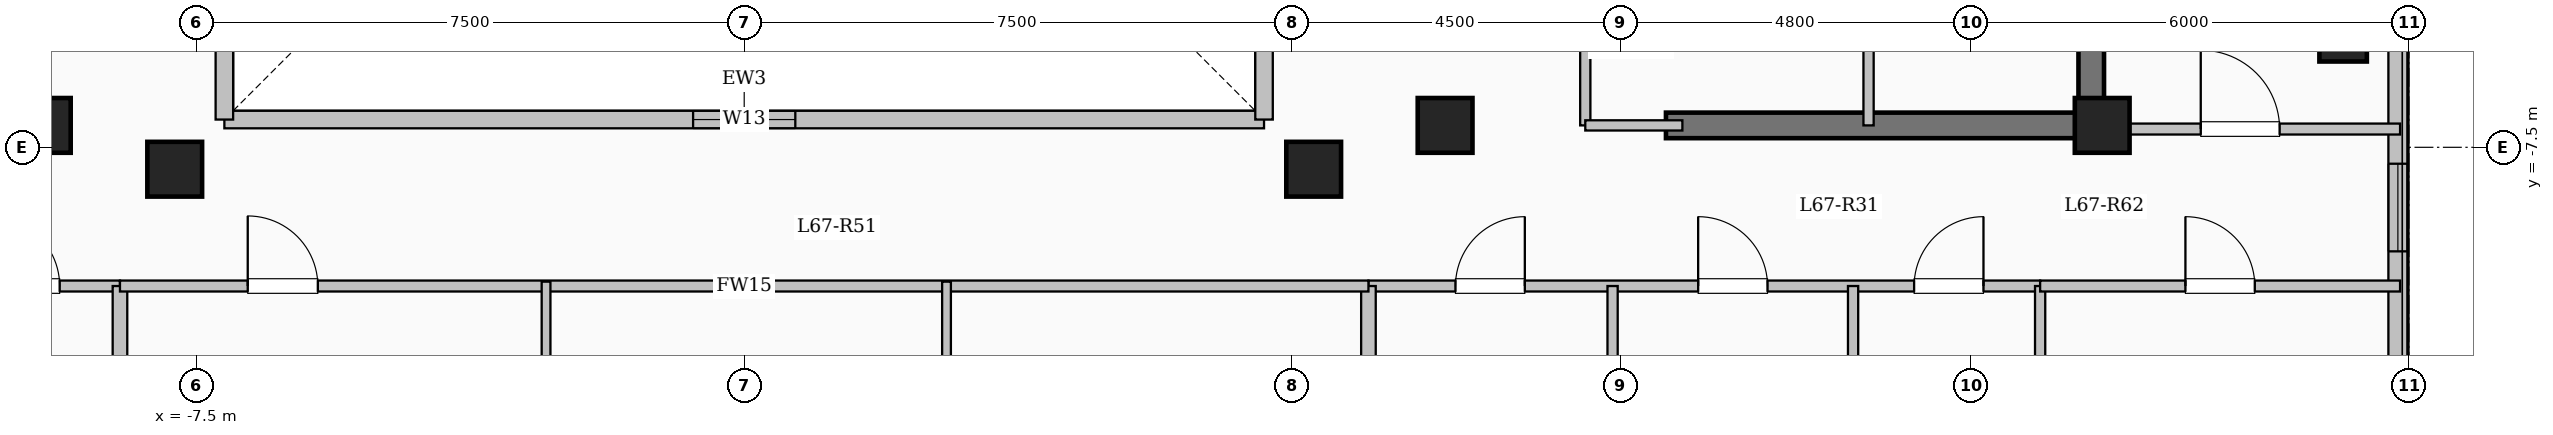
"""IFC4 building model, lengths in metres.
Left out: names, types, materials, properties, quantities, classifications, styles, units other than length and angle.
Written with IfcOpenShell. Run it as: python <this file> out.ifc"""

import sys

from ifc_helpers import new_model, si_unit, direction, frame, frame_2d, origin, origin_2d, place, context, subcontext, project, spatial, rectangle, extrude, element, fill, save


model = new_model("IFC4")
c1 = context("Model", 3, precision=1e-05, world=origin(), true_north=direction((0.0, 1.0)))
c2 = subcontext(c1, "Body", "Model", "MODEL_VIEW")
j1 = project(units=[si_unit("LENGTHUNIT", "METRE"), si_unit("PLANEANGLEUNIT", "RADIAN")], contexts=[c1])
p1 = place(None, origin())
s1 = spatial("IfcSite", under=j1, at=p1, CompositionType="ELEMENT")
p2 = place(p1, origin())
s2 = spatial("IfcBuilding", under=s1, at=p2, CompositionType="ELEMENT")
p3 = place(p2, frame((0.0, 0.0, 248.2)))
s3 = spatial("IfcBuildingStorey", under=s2, at=p3, CompositionType="ELEMENT", Elevation=248.2)
for number, where, z_axis, x_axis in (
    (1, (-7.8, -7.8, 0.0), (0.0, 0.0, 1.0), (1.0, 0.0, 0.0)),
    (2, (7.8, -7.8, 0.0), (0.0, 0.0, 1.0), (1.0, 0.0, 0.0)),
    (3, (-9.6, -7.2, 0.0), (0.0, 0.0, 1.0), (1.0, 0.0, 0.0)),
    (4, (9.6, -7.2, 0.0), (0.0, 0.0, 1.0), (1.0, 0.0, 0.0)),
    (5, (18.6, -7.2, 0.0), (0.0, 0.0, 1.0), (1.0, 0.0, 0.0)),
):
    element("IfcColumn", number, at=place(p3, frame(where, z_axis=z_axis, x_axis=x_axis)), inside=s3, PredefinedType="COLUMN", context=c2, shape_type="SweptSolid", body=[
        extrude(rectangle(XDim=0.75, YDim=0.75, at=origin_2d()), origin(), (0.0, 0.0, 1.0), 3.35),
    ])
p4 = place(p3, frame((21.9, -6.0, 0.0), z_axis=(0.0, 0.0, 1.0), x_axis=(1.0, 0.0, 0.0)))
e6 = element("IfcColumn", 6, at=p4, inside=s3, PredefinedType="COLUMN", context=c2, shape_type="SweptSolid", body=[
    extrude(rectangle(XDim=0.65, YDim=0.65, at=origin_2d()), origin(), (0.0, 0.0, 1.0), 3.35),
])
p5 = place(p3, frame((-7.12, -7.12, 0.0), z_axis=(0.0, 0.0, 1.0), x_axis=(1.0, 0.0, 0.0)))
e7 = element("IfcWall", 7, at=p5, inside=s3, PredefinedType="SOLIDWALL", context=c2, shape_type="SweptSolid", body=[
    extrude(rectangle(XDim=14.24, YDim=0.24, at=frame_2d((7.12, 0.0))), origin(), (0.0, 0.0, 1.0), 3.1),
])
p6 = place(p5, frame((6.42, 0.0, 0.95)))
e8 = element("IfcOpeningElement", 8, at=p6, cuts=e7, PredefinedType="OPENING", context=c2, shape_type="SweptSolid", body=[
    extrude(rectangle(XDim=1.4, YDim=1.5, at=frame_2d((0.7, 0.75))), frame((0.0, 0.13, 0.0), z_axis=(0.0, -1.0, 0.0), x_axis=(1.0, 0.0, 0.0)), (0.0, 0.0, 1.0), 0.26),
])
p7 = place(p3, frame((7.12, -7.12, 0.0), z_axis=(0.0, 0.0, 1.0), x_axis=(0.0, 1.0, 0.0)))
e9 = element("IfcWall", 9, at=p7, inside=s3, PredefinedType="SOLIDWALL", context=c2, shape_type="SweptSolid", body=[
    extrude(rectangle(XDim=14.24, YDim=0.24, at=frame_2d((7.12, 0.0))), origin(), (0.0, 0.0, 1.0), 3.1),
])
p8 = place(p7, frame((6.42, 0.0, 0.95)))
e10 = element("IfcOpeningElement", 10, at=p8, cuts=e9, PredefinedType="OPENING", context=c2, shape_type="SweptSolid", body=[
    extrude(rectangle(XDim=1.4, YDim=1.5, at=frame_2d((0.7, 0.75))), frame((0.0, 0.13, 0.0), z_axis=(0.0, -1.0, 0.0), x_axis=(1.0, 0.0, 0.0)), (0.0, 0.0, 1.0), 0.26),
])
p9 = place(p3, frame((-7.12, 7.12, 0.0), z_axis=(0.0, 0.0, 1.0), x_axis=(0.0, -1.0, 0.0)))
e11 = element("IfcWall", 11, at=p9, inside=s3, PredefinedType="SOLIDWALL", context=c2, shape_type="SweptSolid", body=[
    extrude(rectangle(XDim=14.24, YDim=0.24, at=frame_2d((7.12, 0.0))), origin(), (0.0, 0.0, 1.0), 3.1),
])
p10 = place(p9, frame((6.42, 0.0, 0.95)))
e12 = element("IfcOpeningElement", 12, at=p10, cuts=e11, PredefinedType="OPENING", context=c2, shape_type="SweptSolid", body=[
    extrude(rectangle(XDim=1.4, YDim=1.5, at=frame_2d((0.7, 0.75))), frame((0.0, 0.13, 0.0), z_axis=(0.0, -1.0, 0.0), x_axis=(1.0, 0.0, 0.0)), (0.0, 0.0, 1.0), 0.26),
])
p11 = place(p3, frame((22.65, 17.55, 0.0), z_axis=(0.0, 0.0, 1.0), x_axis=(0.0, -1.0, 0.0)))
e13 = element("IfcWall", 13, at=p11, inside=s3, PredefinedType="SOLIDWALL", context=c2, shape_type="SweptSolid", body=[
    extrude(rectangle(XDim=35.1, YDim=0.26, at=frame_2d((17.55, 0.0))), origin(), (0.0, 0.0, 1.0), 3.1),
])
p12 = place(p11, frame((1.525, 0.0, 0.9)))
e14 = element("IfcOpeningElement", 14, at=p12, cuts=e13, PredefinedType="OPENING", context=c2, shape_type="SweptSolid", body=[
    extrude(rectangle(XDim=2.0, YDim=1.7, at=frame_2d((1.0, 0.85))), frame((0.0, 0.14, 0.0), z_axis=(0.0, -1.0, 0.0), x_axis=(1.0, 0.0, 0.0)), (0.0, 0.0, 1.0), 0.28),
])
p13 = place(p11, frame((5.425, 0.0, 0.95)))
e15 = element("IfcOpeningElement", 15, at=p13, cuts=e13, PredefinedType="OPENING", context=c2, shape_type="SweptSolid", body=[
    extrude(rectangle(XDim=1.0, YDim=1.5, at=frame_2d((0.5, 0.75))), frame((0.0, 0.14, 0.0), z_axis=(0.0, -1.0, 0.0), x_axis=(1.0, 0.0, 0.0)), (0.0, 0.0, 1.0), 0.28),
])
p14 = place(p11, frame((14.8, 0.0, 0.9)))
e16 = element("IfcOpeningElement", 16, at=p14, cuts=e13, PredefinedType="OPENING", context=c2, shape_type="SweptSolid", body=[
    extrude(rectangle(XDim=2.0, YDim=1.7, at=frame_2d((1.0, 0.85))), frame((0.0, 0.14, 0.0), z_axis=(0.0, -1.0, 0.0), x_axis=(1.0, 0.0, 0.0)), (0.0, 0.0, 1.0), 0.28),
])
p15 = place(p11, frame((25.275, 0.0, 0.95)))
e17 = element("IfcOpeningElement", 17, at=p15, cuts=e13, PredefinedType="OPENING", context=c2, shape_type="SweptSolid", body=[
    extrude(rectangle(XDim=1.2, YDim=1.5, at=frame_2d((0.6, 0.75))), frame((0.0, 0.14, 0.0), z_axis=(0.0, -1.0, 0.0), x_axis=(1.0, 0.0, 0.0)), (0.0, 0.0, 1.0), 0.28),
])
p16 = place(p11, frame((29.925, 0.0, 0.9)))
e18 = element("IfcOpeningElement", 18, at=p16, cuts=e13, PredefinedType="OPENING", context=c2, shape_type="SweptSolid", body=[
    extrude(rectangle(XDim=2.2, YDim=1.75, at=frame_2d((1.1, 0.875))), frame((0.0, 0.14, 0.0), z_axis=(0.0, -1.0, 0.0), x_axis=(1.0, 0.0, 0.0)), (0.0, 0.0, 1.0), 0.28),
])
p17 = place(p3, frame((18.45, -7.375, 0.0), z_axis=(0.0, 0.0, 1.0), x_axis=(0.0, 1.0, 0.0)))
e19 = element("IfcWall", 19, at=p17, inside=s3, PredefinedType="SHEAR", context=c2, shape_type="SweptSolid", body=[
    extrude(rectangle(XDim=14.05, YDim=0.35, at=frame_2d((7.025, 0.0))), origin(), (0.0, 0.0, 1.0), 3.35),
])
p18 = place(p3, frame((12.625, -7.2, 0.0), z_axis=(0.0, 0.0, 1.0), x_axis=(1.0, 0.0, 0.0)))
e20 = element("IfcWall", 20, at=p18, inside=s3, PredefinedType="SHEAR", context=c2, shape_type="SweptSolid", body=[
    extrude(rectangle(XDim=6.0, YDim=0.35, at=frame_2d((3.0, 0.0))), origin(), (0.0, 0.0, 1.0), 3.35),
])
p19 = place(p3, frame((15.4, -7.2, 0.0), z_axis=(0.0, 0.0, 1.0), x_axis=(0.0, 1.0, 0.0)))
e21 = element("IfcWall", 21, at=p19, inside=s3, PredefinedType="PARTITIONING", context=c2, shape_type="SweptSolid", body=[
    extrude(rectangle(XDim=10.45, YDim=0.14, at=frame_2d((5.225, 0.0))), origin(), (0.0, 0.0, 1.0), 3.1),
])
p20 = place(p19, frame((9.25, 0.0, 0.0)))
e22 = element("IfcOpeningElement", 22, at=p20, cuts=e21, PredefinedType="OPENING", context=c2, shape_type="SweptSolid", body=[
    extrude(rectangle(XDim=0.9, YDim=2.08, at=frame_2d((0.45, 1.04))), frame((0.0, 0.08, 0.0), z_axis=(0.0, -1.0, 0.0), x_axis=(1.0, 0.0, 0.0)), (0.0, 0.0, 1.0), 0.16),
])
p21 = place(p3, frame((11.52, -7.2, 0.0), z_axis=(0.0, 0.0, 1.0), x_axis=(0.0, 1.0, 0.0)))
e23 = element("IfcWall", 23, at=p21, inside=s3, PredefinedType="PARTITIONING", context=c2, shape_type="SweptSolid", body=[
    extrude(rectangle(XDim=9.12, YDim=0.14, at=frame_2d((4.56, 0.0))), origin(), (0.0, 0.0, 1.0), 3.1),
])
p22 = place(p21, frame((1.8, 0.0, 0.0)))
e24 = element("IfcOpeningElement", 24, at=p22, cuts=e23, PredefinedType="OPENING", context=c2, shape_type="SweptSolid", body=[
    extrude(rectangle(XDim=0.9, YDim=2.08, at=frame_2d((0.45, 1.04))), frame((0.0, 0.08, 0.0), z_axis=(0.0, -1.0, 0.0), x_axis=(1.0, 0.0, 0.0)), (0.0, 0.0, 1.0), 0.16),
])
p23 = place(p21, frame((6.2, 0.0, 0.0)))
e25 = element("IfcOpeningElement", 25, at=p23, cuts=e23, PredefinedType="OPENING", context=c2, shape_type="SweptSolid", body=[
    extrude(rectangle(XDim=0.9, YDim=2.08, at=frame_2d((0.45, 1.04))), frame((0.0, 0.08, 0.0), z_axis=(0.0, -1.0, 0.0), x_axis=(1.0, 0.0, 0.0)), (0.0, 0.0, 1.0), 0.16),
])
p24 = place(p3, frame((11.52, -7.2, 0.0), z_axis=(0.0, 0.0, 1.0), x_axis=(1.0, 0.0, 0.0)))
e26 = element("IfcWall", 26, at=p24, inside=s3, PredefinedType="PARTITIONING", context=c2, shape_type="SweptSolid", body=[
    extrude(rectangle(XDim=1.33, YDim=0.14, at=frame_2d((0.665, 0.0))), origin(), (0.0, 0.0, 1.0), 2.235),
])
p25 = place(p3, frame((-17.75, -9.4, 0.0), z_axis=(0.0, 0.0, 1.0), x_axis=(1.0, 0.0, 0.0)))
e27 = element("IfcWall", 27, at=p25, inside=s3, PredefinedType="PARTITIONING", context=c2, shape_type="SweptSolid", body=[
    extrude(rectangle(XDim=9.2, YDim=0.15, at=frame_2d((4.6, 0.0))), origin(), (0.0, 0.0, 1.0), 3.1),
])
p26 = place(p25, frame((1.142, 0.0, 0.0)))
e28 = element("IfcOpeningElement", 28, at=p26, cuts=e27, PredefinedType="OPENING", context=c2, shape_type="SweptSolid", body=[
    extrude(rectangle(XDim=0.95, YDim=2.15, at=frame_2d((0.475, 1.075))), frame((0.0, 0.085, 0.0), z_axis=(0.0, -1.0, 0.0), x_axis=(1.0, 0.0, 0.0)), (0.0, 0.0, 1.0), 0.17),
])
p27 = place(p25, frame((4.466, 0.0, 0.0)))
e29 = element("IfcOpeningElement", 29, at=p27, cuts=e27, PredefinedType="OPENING", context=c2, shape_type="SweptSolid", body=[
    extrude(rectangle(XDim=0.95, YDim=2.15, at=frame_2d((0.475, 1.075))), frame((0.0, 0.085, 0.0), z_axis=(0.0, -1.0, 0.0), x_axis=(1.0, 0.0, 0.0)), (0.0, 0.0, 1.0), 0.17),
])
p28 = place(p25, frame((7.424, 0.0, 0.0)))
e30 = element("IfcOpeningElement", 30, at=p28, cuts=e27, PredefinedType="OPENING", context=c2, shape_type="SweptSolid", body=[
    extrude(rectangle(XDim=0.95, YDim=2.15, at=frame_2d((0.475, 1.075))), frame((0.0, 0.085, 0.0), z_axis=(0.0, -1.0, 0.0), x_axis=(1.0, 0.0, 0.0)), (0.0, 0.0, 1.0), 0.17),
])
p29 = place(p3, frame((8.55, -9.4, 0.0), z_axis=(0.0, 0.0, 1.0), x_axis=(1.0, 0.0, 0.0)))
e31 = element("IfcWall", 31, at=p29, inside=s3, PredefinedType="PARTITIONING", context=c2, shape_type="SweptSolid", body=[
    extrude(rectangle(XDim=9.2, YDim=0.15, at=frame_2d((4.6, 0.0))), origin(), (0.0, 0.0, 1.0), 3.1),
])
p30 = place(p29, frame((1.192, 0.0, 0.0)))
e32 = element("IfcOpeningElement", 32, at=p30, cuts=e31, PredefinedType="OPENING", context=c2, shape_type="SweptSolid", body=[
    extrude(rectangle(XDim=0.95, YDim=2.15, at=frame_2d((0.475, 1.075))), frame((0.0, 0.085, 0.0), z_axis=(0.0, -1.0, 0.0), x_axis=(1.0, 0.0, 0.0)), (0.0, 0.0, 1.0), 0.17),
])
p31 = place(p29, frame((4.516, 0.0, 0.0)))
e33 = element("IfcOpeningElement", 33, at=p31, cuts=e31, PredefinedType="OPENING", context=c2, shape_type="SweptSolid", body=[
    extrude(rectangle(XDim=0.95, YDim=2.15, at=frame_2d((0.475, 1.075))), frame((0.0, 0.085, 0.0), z_axis=(0.0, -1.0, 0.0), x_axis=(1.0, 0.0, 0.0)), (0.0, 0.0, 1.0), 0.17),
])
p32 = place(p29, frame((7.474, 0.0, 0.0)))
e34 = element("IfcOpeningElement", 34, at=p32, cuts=e31, PredefinedType="OPENING", context=c2, shape_type="SweptSolid", body=[
    extrude(rectangle(XDim=0.95, YDim=2.15, at=frame_2d((0.475, 1.075))), frame((0.0, 0.085, 0.0), z_axis=(0.0, -1.0, 0.0), x_axis=(1.0, 0.0, 0.0)), (0.0, 0.0, 1.0), 0.17),
])
p33 = place(p3, frame((11.894, -20.85, 0.0), z_axis=(0.0, 0.0, 1.0), x_axis=(0.0, 1.0, 0.0)))
e35 = element("IfcWall", 35, at=p33, inside=s3, PredefinedType="PARTITIONING", context=c2, shape_type="SweptSolid", body=[
    extrude(rectangle(XDim=11.45, YDim=0.14, at=frame_2d((5.725, 0.0))), origin(), (0.0, 0.0, 1.0), 3.1),
])
p34 = place(p3, frame((15.188, -20.85, 0.0), z_axis=(0.0, 0.0, 1.0), x_axis=(0.0, 1.0, 0.0)))
e36 = element("IfcWall", 36, at=p34, inside=s3, PredefinedType="PARTITIONING", context=c2, shape_type="SweptSolid", body=[
    extrude(rectangle(XDim=11.45, YDim=0.14, at=frame_2d((5.725, 0.0))), origin(), (0.0, 0.0, 1.0), 2.685),
])
for number, where, z_axis, x_axis in (
    (37, (-8.55, -21.504, 0.0), (0.0, 0.0, 1.0), (0.0, 1.0, 0.0)),
    (38, (8.55, -21.504, 0.0), (0.0, 0.0, 1.0), (0.0, 1.0, 0.0)),
):
    element("IfcWall", number, at=place(p3, frame(where, z_axis=z_axis, x_axis=x_axis)), inside=s3, PredefinedType="SOLIDWALL", context=c2, shape_type="SweptSolid", body=[
        extrude(rectangle(XDim=12.104, YDim=0.2, at=frame_2d((6.052, 0.0))), origin(), (0.0, 0.0, 1.0), 3.1),
    ])
p35 = place(p3, frame((-8.55, -9.4, 0.0), z_axis=(0.0, 0.0, 1.0), x_axis=(1.0, 0.0, 0.0)))
e39 = element("IfcWall", 39, at=p35, inside=s3, PredefinedType="PARTITIONING", context=c2, shape_type="SweptSolid", body=[
    extrude(rectangle(XDim=17.1, YDim=0.15, at=frame_2d((8.55, 0.0))), origin(), (0.0, 0.0, 1.0), 3.1),
])
p36 = place(p35, frame((1.75, 0.0, 0.0)))
e40 = element("IfcOpeningElement", 40, at=p36, cuts=e39, PredefinedType="OPENING", context=c2, shape_type="SweptSolid", body=[
    extrude(rectangle(XDim=0.96, YDim=2.15, at=frame_2d((0.48, 1.075))), frame((0.0, 0.085, 0.0), z_axis=(0.0, -1.0, 0.0), x_axis=(1.0, 0.0, 0.0)), (0.0, 0.0, 1.0), 0.17),
])
p37 = place(p3, frame((-2.714, -22.38, 0.0), z_axis=(0.0, 0.0, 1.0), x_axis=(0.0, 1.0, 0.0)))
e41 = element("IfcWall", 41, at=p37, inside=s3, PredefinedType="PARTITIONING", context=c2, shape_type="SweptSolid", body=[
    extrude(rectangle(XDim=13.04, YDim=0.12, at=frame_2d((6.52, 0.0))), origin(), (0.0, 0.0, 1.0), 3.1),
])
p38 = place(p37, frame((8.705, 0.0, 0.0)))
e42 = element("IfcOpeningElement", 42, at=p38, cuts=e41, PredefinedType="OPENING", context=c2, shape_type="SweptSolid", body=[
    extrude(rectangle(XDim=1.08, YDim=2.15, at=frame_2d((0.54, 1.075))), frame((0.0, 0.07, 0.0), z_axis=(0.0, -1.0, 0.0), x_axis=(1.0, 0.0, 0.0)), (0.0, 0.0, 1.0), 0.14),
])
p39 = place(p3, frame((2.771, -12.31, 0.0), z_axis=(0.0, 0.0, 1.0), x_axis=(0.0, 1.0, 0.0)))
e43 = element("IfcWall", 43, at=p39, inside=s3, PredefinedType="PARTITIONING", context=c2, shape_type="SweptSolid", body=[
    extrude(rectangle(XDim=2.97, YDim=0.12, at=frame_2d((1.485, 0.0))), origin(), (0.0, 0.0, 1.0), 3.1),
])
p40 = place(p3, frame((18.45, -7.25, 0.0), z_axis=(0.0, 0.0, 1.0), x_axis=(1.0, 0.0, 0.0)))
e44 = element("IfcWall", 44, at=p40, inside=s3, PredefinedType="PARTITIONING", context=c2, shape_type="SweptSolid", body=[
    extrude(rectangle(XDim=4.23, YDim=0.15, at=frame_2d((2.115, 0.0))), origin(), (0.0, 0.0, 1.0), 3.1),
])
p41 = place(p40, frame((1.5, 0.0, 0.0)))
e45 = element("IfcOpeningElement", 45, at=p41, cuts=e44, PredefinedType="OPENING", context=c2, shape_type="SweptSolid", body=[
    extrude(rectangle(XDim=1.08, YDim=2.15, at=frame_2d((0.54, 1.075))), frame((0.0, 0.085, 0.0), z_axis=(0.0, -1.0, 0.0), x_axis=(1.0, 0.0, 0.0)), (0.0, 0.0, 1.0), 0.17),
])
p42 = place(p3, frame((17.75, -17.55, 0.0), z_axis=(0.0, 0.0, 1.0), x_axis=(0.0, 1.0, 0.0)))
e46 = element("IfcWall", 46, at=p42, inside=s3, PredefinedType="PARTITIONING", context=c2, shape_type="SweptSolid", body=[
    extrude(rectangle(XDim=8.15, YDim=0.14, at=frame_2d((4.075, 0.0))), origin(), (0.0, 0.0, 1.0), 3.1),
])
p43 = place(p3, frame((17.75, -9.4, 0.0), z_axis=(0.0, 0.0, 1.0), x_axis=(1.0, 0.0, 0.0)))
e47 = element("IfcWall", 47, at=p43, inside=s3, PredefinedType="PARTITIONING", context=c2, shape_type="SweptSolid", body=[
    extrude(rectangle(XDim=4.93, YDim=0.15, at=frame_2d((2.465, 0.0))), origin(), (0.0, 0.0, 1.0), 3.1),
])
p44 = place(p43, frame((1.99, 0.0, 0.0)))
e48 = element("IfcOpeningElement", 48, at=p44, cuts=e47, PredefinedType="OPENING", context=c2, shape_type="SweptSolid", body=[
    extrude(rectangle(XDim=0.95, YDim=2.15, at=frame_2d((0.475, 1.075))), frame((0.0, 0.085, 0.0), z_axis=(0.0, -1.0, 0.0), x_axis=(1.0, 0.0, 0.0)), (0.0, 0.0, 1.0), 0.17),
])
p45 = place(p6, origin())
e49 = element("IfcWindow", 49, at=p45, inside=s3, PartitioningType="SINGLE_PANEL", PredefinedType="WINDOW", context=c2, shape_type="SweptSolid", body=[
    extrude(rectangle(XDim=1.4, YDim=1.5, at=frame_2d((0.7, 0.75))), frame((0.0, 0.03, 0.0), z_axis=(0.0, -1.0, 0.0), x_axis=(1.0, 0.0, 0.0)), (0.0, 0.0, 1.0), 0.06),
])
fill(e8, e49)
p46 = place(p15, origin())
e50 = element("IfcWindow", 50, at=p46, inside=s3, PartitioningType="SINGLE_PANEL", PredefinedType="WINDOW", context=c2, shape_type="SweptSolid", body=[
    extrude(rectangle(XDim=1.2, YDim=1.5, at=frame_2d((0.6, 0.75))), frame((0.0, 0.03, 0.0), z_axis=(0.0, -1.0, 0.0), x_axis=(1.0, 0.0, 0.0)), (0.0, 0.0, 1.0), 0.06),
])
fill(e17, e50)
p47 = place(p28, origin())
e51 = element("IfcDoor", 51, at=p47, inside=s3, OperationType="SINGLE_SWING_LEFT", PredefinedType="DOOR", context=c2, shape_type="SweptSolid", body=[
    extrude(rectangle(XDim=0.95, YDim=2.15, at=frame_2d((0.475, 1.075))), frame((0.0, 0.025, 0.0), z_axis=(0.0, -1.0, 0.0), x_axis=(1.0, 0.0, 0.0)), (0.0, 0.0, 1.0), 0.05),
])
fill(e30, e51)
p48 = place(p30, origin())
e52 = element("IfcDoor", 52, at=p48, inside=s3, OperationType="SINGLE_SWING_RIGHT", PredefinedType="DOOR", context=c2, shape_type="SweptSolid", body=[
    extrude(rectangle(XDim=0.95, YDim=2.15, at=frame_2d((0.475, 1.075))), frame((0.0, 0.025, 0.0), z_axis=(0.0, -1.0, 0.0), x_axis=(1.0, 0.0, 0.0)), (0.0, 0.0, 1.0), 0.05),
])
fill(e32, e52)
p49 = place(p31, origin())
e53 = element("IfcDoor", 53, at=p49, inside=s3, OperationType="SINGLE_SWING_LEFT", PredefinedType="DOOR", context=c2, shape_type="SweptSolid", body=[
    extrude(rectangle(XDim=0.95, YDim=2.15, at=frame_2d((0.475, 1.075))), frame((0.0, 0.025, 0.0), z_axis=(0.0, -1.0, 0.0), x_axis=(1.0, 0.0, 0.0)), (0.0, 0.0, 1.0), 0.05),
])
fill(e33, e53)
p50 = place(p32, origin())
e54 = element("IfcDoor", 54, at=p50, inside=s3, OperationType="SINGLE_SWING_RIGHT", PredefinedType="DOOR", context=c2, shape_type="SweptSolid", body=[
    extrude(rectangle(XDim=0.95, YDim=2.15, at=frame_2d((0.475, 1.075))), frame((0.0, 0.025, 0.0), z_axis=(0.0, -1.0, 0.0), x_axis=(1.0, 0.0, 0.0)), (0.0, 0.0, 1.0), 0.05),
])
fill(e34, e54)
p51 = place(p36, origin())
e55 = element("IfcDoor", 55, at=p51, inside=s3, OperationType="SINGLE_SWING_LEFT", PredefinedType="DOOR", context=c2, shape_type="SweptSolid", body=[
    extrude(rectangle(XDim=0.96, YDim=2.15, at=frame_2d((0.48, 1.075))), frame((0.0, 0.025, 0.0), z_axis=(0.0, -1.0, 0.0), x_axis=(1.0, 0.0, 0.0)), (0.0, 0.0, 1.0), 0.05),
])
fill(e40, e55)
p52 = place(p44, origin())
e56 = element("IfcDoor", 56, at=p52, inside=s3, OperationType="SINGLE_SWING_LEFT", PredefinedType="DOOR", context=c2, shape_type="SweptSolid", body=[
    extrude(rectangle(XDim=0.95, YDim=2.15, at=frame_2d((0.475, 1.075))), frame((0.0, 0.025, 0.0), z_axis=(0.0, -1.0, 0.0), x_axis=(1.0, 0.0, 0.0)), (0.0, 0.0, 1.0), 0.05),
])
fill(e48, e56)
p53 = place(p41, origin())
e57 = element("IfcDoor", 57, at=p53, inside=s3, OperationType="SINGLE_SWING_LEFT", PredefinedType="DOOR", context=c2, shape_type="SweptSolid", body=[
    extrude(rectangle(XDim=1.08, YDim=2.15, at=frame_2d((0.54, 1.075))), frame((0.0, 0.025, 0.0), z_axis=(0.0, -1.0, 0.0), x_axis=(1.0, 0.0, 0.0)), (0.0, 0.0, 1.0), 0.05),
])
fill(e45, e57)
save(model, sys.argv[1])
